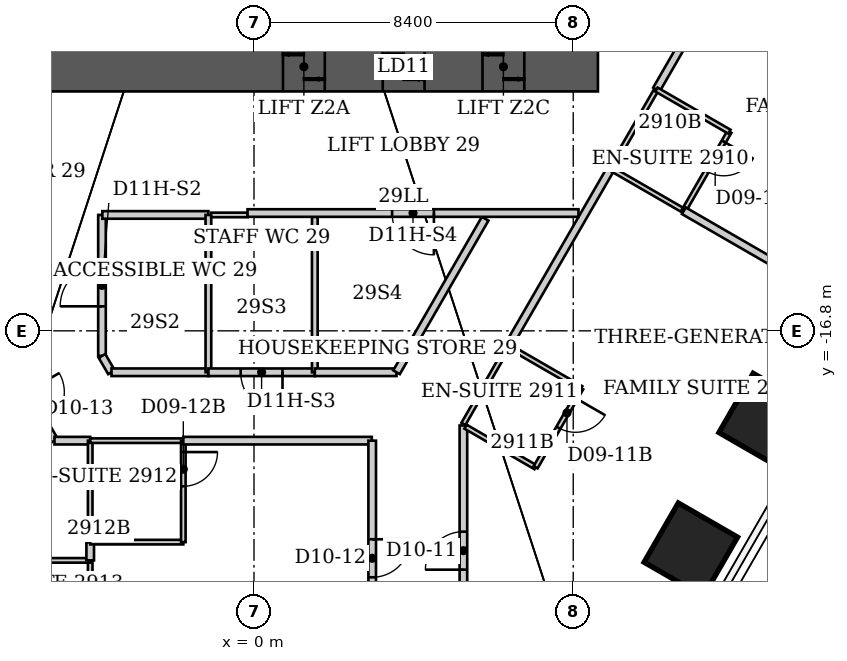
"""IFC4 building model, lengths in metres.
Left out: names, types, materials, properties, quantities, classifications, styles, units other than length and angle.
Written with IfcOpenShell. Run it as: python <this file> out.ifc"""

import sys

from ifc_helpers import new_model, si_unit, direction, frame, frame_2d, origin, origin_2d, place, context, subcontext, project, spatial, rectangle, extrude, element, fill, save


model = new_model("IFC4")
c1 = context("Model", 3, precision=1e-05, world=origin(), true_north=direction((0.0, 1.0)))
c2 = subcontext(c1, "Body", "Model", "MODEL_VIEW")
j1 = project(units=[si_unit("LENGTHUNIT", "METRE"), si_unit("PLANEANGLEUNIT", "RADIAN")], contexts=[c1])
p1 = place(None, origin())
s1 = spatial("IfcSite", under=j1, at=p1, CompositionType="ELEMENT")
p2 = place(p1, origin())
s2 = spatial("IfcBuilding", under=s1, at=p2, CompositionType="ELEMENT")
p3 = place(p2, frame((0.0, 0.0, 119.6)))
s3 = spatial("IfcBuildingStorey", under=s2, at=p3, CompositionType="ELEMENT", Elevation=119.6)
for number, where, z_axis, x_axis in (
    (1, (13.464, -19.147, 0.0), (0.0, 0.0, 1.0), (0.866, -0.5, 0.0)),
    (2, (11.494, -22.559, 0.0), (0.0, 0.0, 1.0), (0.866, -0.5, 0.0)),
):
    element("IfcColumn", number, at=place(p3, frame(where, z_axis=z_axis, x_axis=x_axis)), inside=s3, PredefinedType="COLUMN", context=c2, shape_type="SweptSolid", body=[
        extrude(rectangle(XDim=1.8, YDim=1.8, at=origin_2d()), origin(), (0.0, 0.0, 1.0), 3.8),
    ])
p4 = place(p3, frame((-9.05, -9.85, 0.0), z_axis=(0.0, 0.0, 1.0), x_axis=(1.0, 0.0, 0.0)))
e3 = element("IfcWall", 3, at=p4, inside=s3, PredefinedType="SHEAR", context=c2, shape_type="SweptSolid", body=[
    extrude(rectangle(XDim=18.1, YDim=1.3, at=frame_2d((9.05, 0.0))), origin(), (0.0, 0.0, 1.0), 3.8),
])
p5 = place(p4, frame((1.938, 0.0, 0.0)))
e4 = element("IfcOpeningElement", 4, at=p5, cuts=e3, PredefinedType="OPENING", context=c2, shape_type="SweptSolid", body=[
    extrude(rectangle(XDim=1.1, YDim=2.2, at=frame_2d((0.55, 1.1))), frame((0.0, 0.65, 0.0), z_axis=(0.0, -1.0, 0.0), x_axis=(1.0, 0.0, 0.0)), (0.0, 0.0, 1.0), 1.3),
])
p6 = place(p4, frame((9.812, 0.0, 0.0)))
e5 = element("IfcOpeningElement", 5, at=p6, cuts=e3, PredefinedType="OPENING", context=c2, shape_type="SweptSolid", body=[
    extrude(rectangle(XDim=1.1, YDim=2.1, at=frame_2d((0.55, 1.05))), frame((0.0, 0.65, 0.0), z_axis=(0.0, -1.0, 0.0), x_axis=(1.0, 0.0, 0.0)), (0.0, 0.0, 1.0), 1.3),
])
p7 = place(p4, frame((12.438, 0.0, 0.0)))
e6 = element("IfcOpeningElement", 6, at=p7, cuts=e3, PredefinedType="OPENING", context=c2, shape_type="SweptSolid", body=[
    extrude(rectangle(XDim=1.1, YDim=2.1, at=frame_2d((0.55, 1.05))), frame((0.0, 0.65, 0.0), z_axis=(0.0, -1.0, 0.0), x_axis=(1.0, 0.0, 0.0)), (0.0, 0.0, 1.0), 1.3),
])
p8 = place(p4, frame((15.062, 0.0, 0.0)))
e7 = element("IfcOpeningElement", 7, at=p8, cuts=e3, PredefinedType="OPENING", context=c2, shape_type="SweptSolid", body=[
    extrude(rectangle(XDim=1.1, YDim=2.1, at=frame_2d((0.55, 1.05))), frame((0.0, 0.65, 0.0), z_axis=(0.0, -1.0, 0.0), x_axis=(1.0, 0.0, 0.0)), (0.0, 0.0, 1.0), 1.3),
])
p9 = place(p3, frame((-6.23, -18.0, 0.0), z_axis=(0.0, 0.0, 1.0), x_axis=(0.501647016168, -0.86507240805, 0.0)))
e8 = element("IfcWall", 8, at=p9, inside=s3, PredefinedType="PARTITIONING", context=c2, shape_type="SweptSolid", body=[
    extrude(rectangle(XDim=1.954, YDim=0.2, at=frame_2d((0.977, 0.0))), origin(), (0.0, 0.0, 1.0), 3.64),
])
p10 = place(p9, frame((0.477, 0.0, 0.0)))
e9 = element("IfcOpeningElement", 9, at=p10, cuts=e8, PredefinedType="OPENING", context=c2, shape_type="SweptSolid", body=[
    extrude(rectangle(XDim=1.0, YDim=2.13, at=frame_2d((0.5, 1.065))), frame((0.0, 0.1, 0.0), z_axis=(0.0, -1.0, 0.0), x_axis=(1.0, 0.0, 0.0)), (0.0, 0.0, 1.0), 0.2),
])
p11 = place(p3, frame((-5.25, -19.69, 0.0), z_axis=(0.0, 0.0, 1.0), x_axis=(1.0, 0.0, 0.0)))
e10 = element("IfcWall", 10, at=p11, inside=s3, PredefinedType="PARTITIONING", context=c2, shape_type="SweptSolid", body=[
    extrude(rectangle(XDim=0.94, YDim=0.2, at=frame_2d((0.47, 0.0))), origin(), (0.0, 0.0, 1.0), 3.64),
])
p12 = place(p3, frame((-4.31, -24.84, 0.0), z_axis=(0.0, 0.0, 1.0), x_axis=(0.0, 1.0, 0.0)))
e11 = element("IfcWall", 11, at=p12, inside=s3, PredefinedType="PARTITIONING", context=c2, shape_type="SweptSolid", body=[
    extrude(rectangle(XDim=2.0, YDim=0.12, at=frame_2d((1.0, 0.0))), origin(), (0.0, 0.0, 1.0), 3.64),
])
p13 = place(p3, frame((-4.31, -22.84, 0.0), z_axis=(0.0, 0.0, 1.0), x_axis=(-1.0, 0.0, 0.0)))
e12 = element("IfcWall", 12, at=p13, inside=s3, PredefinedType="PARTITIONING", context=c2, shape_type="SweptSolid", body=[
    extrude(rectangle(XDim=2.4, YDim=0.12, at=frame_2d((1.2, 0.0))), origin(), (0.0, 0.0, 1.0), 3.64),
])
p14 = place(p3, frame((-4.31, -22.84, 0.0), z_axis=(0.0, 0.0, 1.0), x_axis=(0.0, 1.0, 0.0)))
e13 = element("IfcWall", 13, at=p14, inside=s3, PredefinedType="PARTITIONING", context=c2, shape_type="SweptSolid", body=[
    extrude(rectangle(XDim=0.48, YDim=0.2, at=frame_2d((0.24, 0.0))), origin(), (0.0, 0.0, 1.0), 3.64),
])
p15 = place(p3, frame((-4.31, -22.36, 0.0), z_axis=(0.0, 0.0, 1.0), x_axis=(0.0, 1.0, 0.0)))
e14 = element("IfcWall", 14, at=p15, inside=s3, PredefinedType="PARTITIONING", context=c2, shape_type="SweptSolid", body=[
    extrude(rectangle(XDim=2.67, YDim=0.12, at=frame_2d((1.335, 0.0))), origin(), (0.0, 0.0, 1.0), 3.64),
])
for number, where, z_axis, x_axis in (
    (15, (-4.31, -22.36, 0.0), (0.0, 0.0, 1.0), (1.0, 0.0, 0.0)),
    (16, (-4.31, -19.69, 0.0), (0.0, 0.0, 1.0), (1.0, 0.0, 0.0)),
):
    element("IfcWall", number, at=place(p3, frame(where, z_axis=z_axis, x_axis=x_axis)), inside=s3, PredefinedType="PARTITIONING", context=c2, shape_type="SweptSolid", body=[
        extrude(rectangle(XDim=2.45, YDim=0.12, at=frame_2d((1.225, 0.0))), origin(), (0.0, 0.0, 1.0), 3.64),
    ])
p16 = place(p3, frame((-4.0, -17.46, 0.0), z_axis=(0.0, 0.0, 1.0), x_axis=(0.0, 1.0, 0.0)))
e17 = element("IfcWall", 17, at=p16, inside=s3, PredefinedType="PARTITIONING", context=c2, shape_type="SweptSolid", body=[
    extrude(rectangle(XDim=3.71, YDim=0.2, at=frame_2d((1.855, 0.0))), origin(), (0.0, 0.0, 1.0), 2.878),
])
p17 = place(p16, frame((1.305, 0.0, 0.0)))
e18 = element("IfcOpeningElement", 18, at=p17, cuts=e17, PredefinedType="OPENING", context=c2, shape_type="SweptSolid", body=[
    extrude(rectangle(XDim=1.1, YDim=2.2, at=frame_2d((0.55, 1.1))), frame((0.0, 0.1, 0.0), z_axis=(0.0, -1.0, 0.0), x_axis=(1.0, 0.0, 0.0)), (0.0, 0.0, 1.0), 0.2),
])
p18 = place(p3, frame((-3.99, -13.75, 0.0), z_axis=(0.0, 0.0, 1.0), x_axis=(1.0, 0.0, 0.0)))
e19 = element("IfcWall", 19, at=p18, inside=s3, PredefinedType="PARTITIONING", context=c2, shape_type="SweptSolid", body=[
    extrude(rectangle(XDim=2.79, YDim=0.2, at=frame_2d((1.395, 0.0))), origin(), (0.0, 0.0, 1.0), 3.64),
])
p19 = place(p3, frame((-3.75, -17.89, 0.0), z_axis=(0.0, 0.0, 1.0), x_axis=(-0.502680181512, 0.864472460588, 0.0)))
e20 = element("IfcWall", 20, at=p19, inside=s3, PredefinedType="PARTITIONING", context=c2, shape_type="SweptSolid", body=[
    extrude(rectangle(XDim=0.497, YDim=0.2, at=frame_2d((0.249, 0.0))), origin(), (0.0, 0.0, 1.0), 3.64),
])
p20 = place(p3, frame((-1.86, -22.36, 0.0), z_axis=(0.0, 0.0, 1.0), x_axis=(0.0, 1.0, 0.0)))
e21 = element("IfcWall", 21, at=p20, inside=s3, PredefinedType="PARTITIONING", context=c2, shape_type="SweptSolid", body=[
    extrude(rectangle(XDim=2.67, YDim=0.12, at=frame_2d((1.335, 0.0))), origin(), (0.0, 0.0, 1.0), 2.86),
])
p21 = place(p20, frame((1.47, 0.0, 0.0)))
e22 = element("IfcOpeningElement", 22, at=p21, cuts=e21, PredefinedType="OPENING", context=c2, shape_type="SweptSolid", body=[
    extrude(rectangle(XDim=0.9, YDim=2.03, at=frame_2d((0.45, 1.015))), frame((0.0, 0.06, 0.0), z_axis=(0.0, -1.0, 0.0), x_axis=(1.0, 0.0, 0.0)), (0.0, 0.0, 1.0), 0.12),
])
p22 = place(p3, frame((-1.86, -19.69, 0.0), z_axis=(0.0, 0.0, 1.0), x_axis=(1.0, 0.0, 0.0)))
e23 = element("IfcWall", 23, at=p22, inside=s3, PredefinedType="PARTITIONING", context=c2, shape_type="SweptSolid", body=[
    extrude(rectangle(XDim=4.96, YDim=0.2, at=frame_2d((2.48, 0.0))), origin(), (0.0, 0.0, 1.0), 3.64),
])
p23 = place(p3, frame((-1.2, -17.89, 0.0), z_axis=(0.0, 0.0, 1.0), x_axis=(-1.0, 0.0, 0.0)))
e24 = element("IfcWall", 24, at=p23, inside=s3, PredefinedType="PARTITIONING", context=c2, shape_type="SweptSolid", body=[
    extrude(rectangle(XDim=2.55, YDim=0.2, at=frame_2d((1.275, 0.0))), origin(), (0.0, 0.0, 1.0), 3.64),
])
p24 = place(p3, frame((-1.2, -13.75, 0.0), z_axis=(0.0, 0.0, 1.0), x_axis=(0.0, -1.0, 0.0)))
e25 = element("IfcWall", 25, at=p24, inside=s3, PredefinedType="PARTITIONING", context=c2, shape_type="SweptSolid", body=[
    extrude(rectangle(XDim=4.14, YDim=0.15, at=frame_2d((2.07, 0.0))), origin(), (0.0, 0.0, 1.0), 3.64),
])
p25 = place(p3, frame((-1.125, -13.75, 0.0), z_axis=(0.0, 0.0, 1.0), x_axis=(1.0, 0.0, 0.0)))
e26 = element("IfcWall", 26, at=p25, inside=s3, PredefinedType="PARTITIONING", context=c2, shape_type="SweptSolid", body=[
    extrude(rectangle(XDim=0.955, YDim=0.12, at=frame_2d((0.478, 0.0))), origin(), (0.0, 0.0, 1.0), 3.64),
])
p26 = place(p3, frame((1.6, -17.89, 0.0), z_axis=(0.0, 0.0, 1.0), x_axis=(-1.0, 0.0, 0.0)))
e27 = element("IfcWall", 27, at=p26, inside=s3, PredefinedType="PARTITIONING", context=c2, shape_type="SweptSolid", body=[
    extrude(rectangle(XDim=2.8, YDim=0.2, at=frame_2d((1.4, 0.0))), origin(), (0.0, 0.0, 1.0), 3.64),
])
p27 = place(p26, frame((0.85, 0.0, 0.0)))
e28 = element("IfcOpeningElement", 28, at=p27, cuts=e27, PredefinedType="OPENING", context=c2, shape_type="SweptSolid", body=[
    extrude(rectangle(XDim=1.1, YDim=2.2, at=frame_2d((0.55, 1.1))), frame((0.0, 0.1, 0.0), z_axis=(0.0, -1.0, 0.0), x_axis=(1.0, 0.0, 0.0)), (0.0, 0.0, 1.0), 0.2),
])
p28 = place(p3, frame((1.6, -13.8, 0.0), z_axis=(0.0, 0.0, 1.0), x_axis=(0.0, -1.0, 0.0)))
e29 = element("IfcWall", 29, at=p28, inside=s3, PredefinedType="PARTITIONING", context=c2, shape_type="SweptSolid", body=[
    extrude(rectangle(XDim=4.09, YDim=0.15, at=frame_2d((2.045, 0.0))), origin(), (0.0, 0.0, 1.0), 3.64),
])
p29 = place(p3, frame((3.11, -19.69, 0.0), z_axis=(0.0, 0.0, 1.0), x_axis=(0.0, -1.0, 0.0)))
e30 = element("IfcWall", 30, at=p29, inside=s3, PredefinedType="PARTITIONING", context=c2, shape_type="SweptSolid", body=[
    extrude(rectangle(XDim=6.19, YDim=0.2, at=frame_2d((3.095, 0.0))), origin(), (0.0, 0.0, 1.0), 3.64),
])
p30 = place(p29, frame((2.595, 0.0, 0.0)))
e31 = element("IfcOpeningElement", 31, at=p30, cuts=e30, PredefinedType="OPENING", context=c2, shape_type="SweptSolid", body=[
    extrude(rectangle(XDim=1.0, YDim=2.13, at=frame_2d((0.5, 1.065))), frame((0.0, 0.1, 0.0), z_axis=(0.0, -1.0, 0.0), x_axis=(1.0, 0.0, 0.0)), (0.0, 0.0, 1.0), 0.2),
])
p31 = place(p3, frame((3.75, -17.89, 0.0), z_axis=(0.0, 0.0, 1.0), x_axis=(-1.0, 0.0, 0.0)))
e32 = element("IfcWall", 32, at=p31, inside=s3, PredefinedType="PARTITIONING", context=c2, shape_type="SweptSolid", body=[
    extrude(rectangle(XDim=2.15, YDim=0.2, at=frame_2d((1.075, 0.0))), origin(), (0.0, 0.0, 1.0), 3.64),
])
p32 = place(p3, frame((5.51, -25.88, 0.0), z_axis=(0.0, 0.0, 1.0), x_axis=(0.0, 1.0, 0.0)))
e33 = element("IfcWall", 33, at=p32, inside=s3, PredefinedType="PARTITIONING", context=c2, shape_type="SweptSolid", body=[
    extrude(rectangle(XDim=6.59, YDim=0.2, at=frame_2d((3.295, 0.0))), origin(), (0.0, 0.0, 1.0), 3.64),
])
p33 = place(p32, frame((2.795, 0.0, 0.0)))
e34 = element("IfcOpeningElement", 34, at=p33, cuts=e33, PredefinedType="OPENING", context=c2, shape_type="SweptSolid", body=[
    extrude(rectangle(XDim=1.0, YDim=2.13, at=frame_2d((0.5, 1.065))), frame((0.0, 0.1, 0.0), z_axis=(0.0, -1.0, 0.0), x_axis=(1.0, 0.0, 0.0)), (0.0, 0.0, 1.0), 0.2),
])
p34 = place(p3, frame((5.51, -19.25, 0.0), z_axis=(0.0, 0.0, 1.0), x_axis=(0.498837591974, 0.866695481028, 0.0)))
e35 = element("IfcWall", 35, at=p34, inside=s3, PredefinedType="PARTITIONING", context=c2, shape_type="SweptSolid", body=[
    extrude(rectangle(XDim=2.365, YDim=0.12, at=frame_2d((1.183, 0.0))), origin(), (0.0, 0.0, 1.0), 3.64),
])
p35 = place(p3, frame((5.566, -19.323, 0.0), z_axis=(0.0, 0.0, 1.0), x_axis=(0.865436746432, -0.501018201192, 0.0)))
e36 = element("IfcWall", 36, at=p35, inside=s3, PredefinedType="PARTITIONING", context=c2, shape_type="SweptSolid", body=[
    extrude(rectangle(XDim=2.13, YDim=0.12, at=frame_2d((1.065, 0.0))), origin(), (0.0, 0.0, 1.0), 3.64),
])
p36 = place(p3, frame((6.083, -13.85, 0.0), z_axis=(0.0, 0.0, 1.0), x_axis=(-0.499977643516, -0.866038310922, 0.0)))
e37 = element("IfcWall", 37, at=p36, inside=s3, PredefinedType="PARTITIONING", context=c2, shape_type="SweptSolid", body=[
    extrude(rectangle(XDim=4.665, YDim=0.2, at=frame_2d((2.333, 0.0))), origin(), (0.0, 0.0, 1.0), 3.64),
])
p37 = place(p3, frame((6.69, -17.2, 0.0), z_axis=(0.0, 0.0, 1.0), x_axis=(0.500524150216, 0.865722573952, 0.0)))
e38 = element("IfcWall", 38, at=p37, inside=s3, PredefinedType="PARTITIONING", context=c2, shape_type="SweptSolid", body=[
    extrude(rectangle(XDim=5.394, YDim=0.2, at=frame_2d((2.697, 0.0))), origin(), (0.0, 0.0, 1.0), 3.64),
])
p38 = place(p3, frame((7.41, -20.39, 0.0), z_axis=(0.0, 0.0, 1.0), x_axis=(0.499737123639, 0.866177122335, 0.0)))
e39 = element("IfcWall", 39, at=p38, inside=s3, PredefinedType="PARTITIONING", context=c2, shape_type="SweptSolid", body=[
    extrude(rectangle(XDim=2.401, YDim=0.12, at=frame_2d((1.201, 0.0))), origin(), (0.0, 0.0, 1.0), 3.64),
])
p39 = place(p38, frame((1.201, 0.0, 0.0)))
e40 = element("IfcOpeningElement", 40, at=p39, cuts=e39, PredefinedType="OPENING", context=c2, shape_type="SweptSolid", body=[
    extrude(rectangle(XDim=0.9, YDim=2.03, at=frame_2d((0.45, 1.015))), frame((0.0, 0.06, 0.0), z_axis=(0.0, -1.0, 0.0), x_axis=(1.0, 0.0, 0.0)), (0.0, 0.0, 1.0), 0.12),
])
p40 = place(p3, frame((8.538, -13.7, 0.0), z_axis=(0.0, 0.0, 1.0), x_axis=(-1.0, 0.0, 0.0)))
e41 = element("IfcWall", 41, at=p40, inside=s3, PredefinedType="PARTITIONING", context=c2, shape_type="SweptSolid", body=[
    extrude(rectangle(XDim=8.708, YDim=0.2, at=frame_2d((4.354, 0.0))), origin(), (0.0, 0.0, 1.0), 3.64),
])
p41 = place(p40, frame((3.804, 0.0, 0.0)))
e42 = element("IfcOpeningElement", 42, at=p41, cuts=e41, PredefinedType="OPENING", context=c2, shape_type="SweptSolid", body=[
    extrude(rectangle(XDim=1.1, YDim=2.2, at=frame_2d((0.55, 1.1))), frame((0.0, 0.1, 0.0), z_axis=(0.0, -1.0, 0.0), x_axis=(1.0, 0.0, 0.0)), (0.0, 0.0, 1.0), 0.2),
])
p42 = place(p3, frame((8.61, -18.31, 0.0), z_axis=(0.0, 0.0, 1.0), x_axis=(-0.865732595383, 0.500506816428, 0.0)))
e43 = element("IfcWall", 43, at=p42, inside=s3, PredefinedType="PARTITIONING", context=c2, shape_type="SweptSolid", body=[
    extrude(rectangle(XDim=2.218, YDim=0.12, at=frame_2d((1.109, 0.0))), origin(), (0.0, 0.0, 1.0), 3.64),
])
p43 = place(p3, frame((9.39, -12.53, 0.0), z_axis=(0.0, 0.0, 1.0), x_axis=(0.499769390944, 0.866158505053, 0.0)))
e44 = element("IfcWall", 44, at=p43, inside=s3, PredefinedType="PARTITIONING", context=c2, shape_type="SweptSolid", body=[
    extrude(rectangle(XDim=2.402, YDim=0.12, at=frame_2d((1.201, 0.0))), origin(), (0.0, 0.0, 1.0), 3.64),
])
p44 = place(p3, frame((9.39, -12.53, 0.0), z_axis=(0.0, 0.0, 1.0), x_axis=(0.865732595383, -0.500506816428, 0.0)))
e45 = element("IfcWall", 45, at=p44, inside=s3, PredefinedType="PARTITIONING", context=c2, shape_type="SweptSolid", body=[
    extrude(rectangle(XDim=2.218, YDim=0.12, at=frame_2d((1.109, 0.0))), origin(), (0.0, 0.0, 1.0), 3.64),
])
p45 = place(p3, frame((10.59, -10.45, 0.0), z_axis=(0.0, 0.0, 1.0), x_axis=(0.499408130876, 0.866366850021, 0.0)))
e46 = element("IfcWall", 46, at=p45, inside=s3, PredefinedType="PARTITIONING", context=c2, shape_type="SweptSolid", body=[
    extrude(rectangle(XDim=4.595, YDim=0.2, at=frame_2d((2.298, 0.0))), origin(), (0.0, 0.0, 1.0), 3.64),
])
p46 = place(p3, frame((11.31, -13.64, 0.0), z_axis=(0.0, 0.0, 1.0), x_axis=(0.499737123639, 0.866177122335, 0.0)))
e47 = element("IfcWall", 47, at=p46, inside=s3, PredefinedType="PARTITIONING", context=c2, shape_type="SweptSolid", body=[
    extrude(rectangle(XDim=2.401, YDim=0.12, at=frame_2d((1.201, 0.0))), origin(), (0.0, 0.0, 1.0), 3.64),
])
p47 = place(p46, frame((1.201, 0.0, 0.0)))
e48 = element("IfcOpeningElement", 48, at=p47, cuts=e47, PredefinedType="OPENING", context=c2, shape_type="SweptSolid", body=[
    extrude(rectangle(XDim=0.9, YDim=2.03, at=frame_2d((0.45, 1.015))), frame((0.0, 0.06, 0.0), z_axis=(0.0, -1.0, 0.0), x_axis=(1.0, 0.0, 0.0)), (0.0, 0.0, 1.0), 0.12),
])
p48 = place(p3, frame((11.31, -13.64, 0.0), z_axis=(0.0, 0.0, 1.0), x_axis=(0.865919350456, -0.50018364478, 0.0)))
e49 = element("IfcWall", 49, at=p48, inside=s3, PredefinedType="PARTITIONING", context=c2, shape_type="SweptSolid", body=[
    extrude(rectangle(XDim=5.758, YDim=0.2, at=frame_2d((2.879, 0.0))), origin(), (0.0, 0.0, 1.0), 3.64),
])
p49 = place(p3, frame((12.51, -11.56, 0.0), z_axis=(0.0, 0.0, 1.0), x_axis=(-0.865705017107, 0.500554515868, 0.0)))
e50 = element("IfcWall", 50, at=p49, inside=s3, PredefinedType="PARTITIONING", context=c2, shape_type="SweptSolid", body=[
    extrude(rectangle(XDim=2.218, YDim=0.12, at=frame_2d((1.109, 0.0))), origin(), (0.0, 0.0, 1.0), 3.64),
])
p50 = place(p3, frame((12.89, -6.46, 0.0), z_axis=(0.0, 0.0, 1.0), x_axis=(0.866181559118, -0.499729433437, 0.0)))
e51 = element("IfcWall", 51, at=p50, inside=s3, PredefinedType="PARTITIONING", context=c2, shape_type="SweptSolid", body=[
    extrude(rectangle(XDim=8.075, YDim=0.2, at=frame_2d((4.037, 0.0))), origin(), (0.0, 0.0, 1.0), 3.64),
])
p51 = place(p50, frame((3.537, 0.0, 0.0)))
e52 = element("IfcOpeningElement", 52, at=p51, cuts=e51, PredefinedType="OPENING", context=c2, shape_type="SweptSolid", body=[
    extrude(rectangle(XDim=1.0, YDim=2.13, at=frame_2d((0.5, 1.065))), frame((0.0, 0.1, 0.0), z_axis=(0.0, -1.0, 0.0), x_axis=(1.0, 0.0, 0.0)), (0.0, 0.0, 1.0), 0.2),
])
p52 = place(p47, origin())
e53 = element("IfcDoor", 53, at=p52, inside=s3, OperationType="SINGLE_SWING_RIGHT", PredefinedType="DOOR", context=c2, shape_type="SweptSolid", body=[
    extrude(rectangle(XDim=0.9, YDim=2.03, at=frame_2d((0.45, 1.015))), frame((0.0, 0.025, 0.0), z_axis=(0.0, -1.0, 0.0), x_axis=(1.0, 0.0, 0.0)), (0.0, 0.0, 1.0), 0.05),
])
fill(e48, e53)
p53 = place(p33, origin())
e54 = element("IfcDoor", 54, at=p53, inside=s3, OperationType="SINGLE_SWING_LEFT", PredefinedType="DOOR", context=c2, shape_type="SweptSolid", body=[
    extrude(rectangle(XDim=1.0, YDim=2.13, at=frame_2d((0.5, 1.065))), frame((0.0, 0.025, 0.0), z_axis=(0.0, -1.0, 0.0), x_axis=(1.0, 0.0, 0.0)), (0.0, 0.0, 1.0), 0.05),
])
fill(e34, e54)
p54 = place(p39, origin())
e55 = element("IfcDoor", 55, at=p54, inside=s3, OperationType="SINGLE_SWING_RIGHT", PredefinedType="DOOR", context=c2, shape_type="SweptSolid", body=[
    extrude(rectangle(XDim=0.9, YDim=2.03, at=frame_2d((0.45, 1.015))), frame((0.0, 0.025, 0.0), z_axis=(0.0, -1.0, 0.0), x_axis=(1.0, 0.0, 0.0)), (0.0, 0.0, 1.0), 0.05),
])
fill(e40, e55)
p55 = place(p30, origin())
e56 = element("IfcDoor", 56, at=p55, inside=s3, OperationType="SINGLE_SWING_LEFT", PredefinedType="DOOR", context=c2, shape_type="SweptSolid", body=[
    extrude(rectangle(XDim=1.0, YDim=2.13, at=frame_2d((0.5, 1.065))), frame((0.0, 0.025, 0.0), z_axis=(0.0, -1.0, 0.0), x_axis=(1.0, 0.0, 0.0)), (0.0, 0.0, 1.0), 0.05),
])
fill(e31, e56)
p56 = place(p21, origin())
e57 = element("IfcDoor", 57, at=p56, inside=s3, OperationType="SINGLE_SWING_RIGHT", PredefinedType="DOOR", context=c2, shape_type="SweptSolid", body=[
    extrude(rectangle(XDim=0.9, YDim=2.03, at=frame_2d((0.45, 1.015))), frame((0.0, 0.025, 0.0), z_axis=(0.0, -1.0, 0.0), x_axis=(1.0, 0.0, 0.0)), (0.0, 0.0, 1.0), 0.05),
])
fill(e22, e57)
p57 = place(p17, origin())
e58 = element("IfcDoor", 58, at=p57, inside=s3, OperationType="SINGLE_SWING_LEFT", PredefinedType="DOOR", context=c2, shape_type="SweptSolid", body=[
    extrude(rectangle(XDim=1.1, YDim=2.2, at=frame_2d((0.55, 1.1))), frame((0.0, 0.025, 0.0), z_axis=(0.0, -1.0, 0.0), x_axis=(1.0, 0.0, 0.0)), (0.0, 0.0, 1.0), 0.05),
])
fill(e18, e58)
p58 = place(p27, origin())
e59 = element("IfcDoor", 59, at=p58, inside=s3, OperationType="SINGLE_SWING_LEFT", PredefinedType="DOOR", context=c2, shape_type="SweptSolid", body=[
    extrude(rectangle(XDim=1.1, YDim=2.2, at=frame_2d((0.55, 1.1))), frame((0.0, 0.025, 0.0), z_axis=(0.0, -1.0, 0.0), x_axis=(1.0, 0.0, 0.0)), (0.0, 0.0, 1.0), 0.05),
])
fill(e28, e59)
p59 = place(p41, origin())
e60 = element("IfcDoor", 60, at=p59, inside=s3, OperationType="SINGLE_SWING_LEFT", PredefinedType="DOOR", context=c2, shape_type="SweptSolid", body=[
    extrude(rectangle(XDim=1.1, YDim=2.2, at=frame_2d((0.55, 1.1))), frame((0.0, 0.025, 0.0), z_axis=(0.0, -1.0, 0.0), x_axis=(1.0, 0.0, 0.0)), (0.0, 0.0, 1.0), 0.05),
])
fill(e42, e60)
p60 = place(p6, origin())
e61 = element("IfcDoor", 61, at=p60, inside=s3, OperationType="DOUBLE_DOOR_SLIDING", PredefinedType="DOOR", context=c2, shape_type="SweptSolid", body=[
    extrude(rectangle(XDim=1.1, YDim=2.1, at=frame_2d((0.55, 1.05))), frame((0.0, 0.025, 0.0), z_axis=(0.0, -1.0, 0.0), x_axis=(1.0, 0.0, 0.0)), (0.0, 0.0, 1.0), 0.05),
])
fill(e5, e61)
p61 = place(p7, origin())
e62 = element("IfcDoor", 62, at=p61, inside=s3, OperationType="DOUBLE_DOOR_SLIDING", PredefinedType="DOOR", context=c2, shape_type="SweptSolid", body=[
    extrude(rectangle(XDim=1.1, YDim=2.1, at=frame_2d((0.55, 1.05))), frame((0.0, 0.025, 0.0), z_axis=(0.0, -1.0, 0.0), x_axis=(1.0, 0.0, 0.0)), (0.0, 0.0, 1.0), 0.05),
])
fill(e6, e62)
p62 = place(p8, origin())
e63 = element("IfcDoor", 63, at=p62, inside=s3, OperationType="DOUBLE_DOOR_SLIDING", PredefinedType="DOOR", context=c2, shape_type="SweptSolid", body=[
    extrude(rectangle(XDim=1.1, YDim=2.1, at=frame_2d((0.55, 1.05))), frame((0.0, 0.025, 0.0), z_axis=(0.0, -1.0, 0.0), x_axis=(1.0, 0.0, 0.0)), (0.0, 0.0, 1.0), 0.05),
])
fill(e7, e63)
save(model, sys.argv[1])
